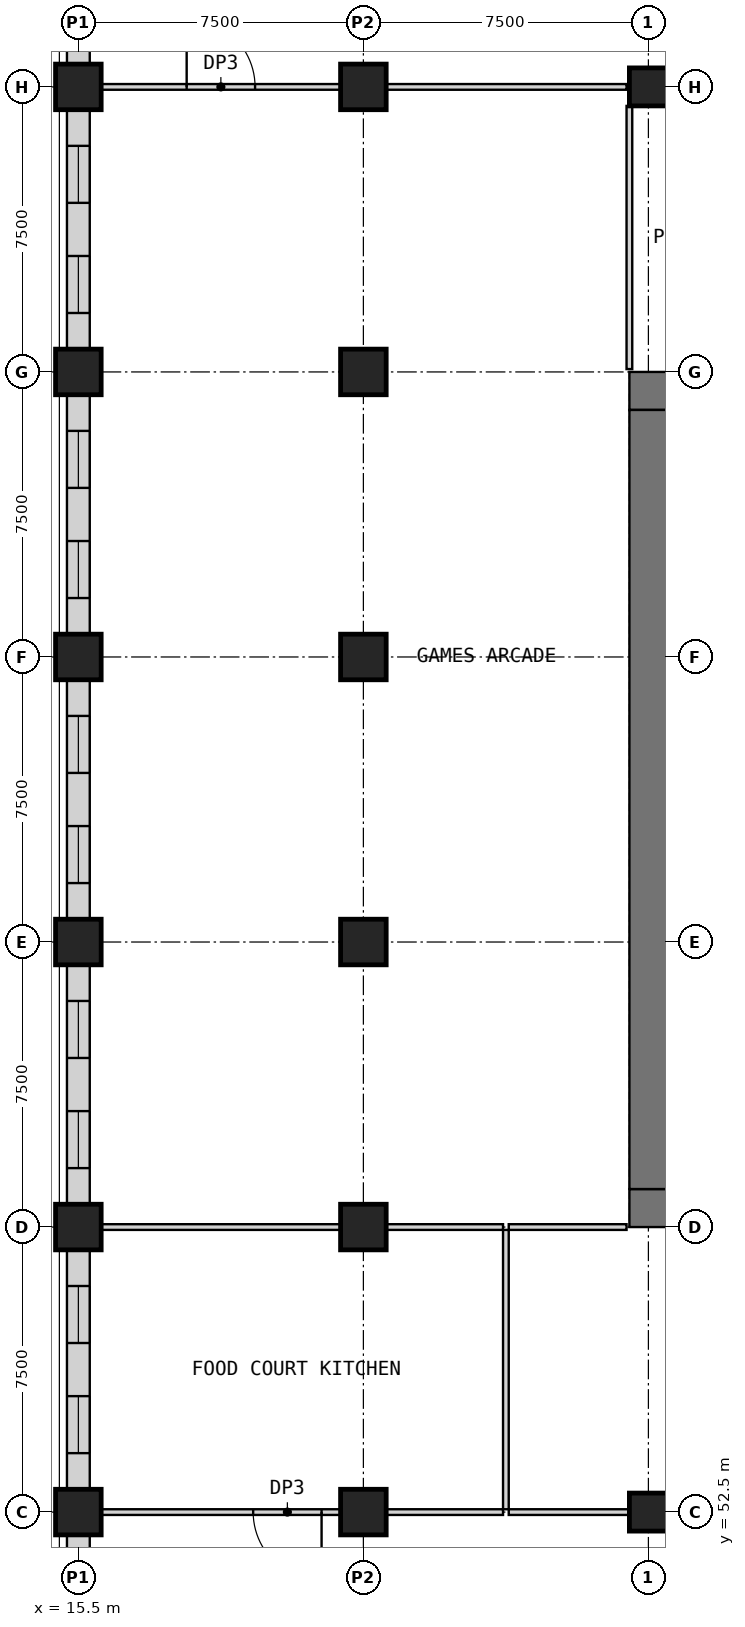
"""IFC4 building model, lengths in metres.
Left out: names, types, materials, properties, quantities, classifications, styles, units other than length and angle.
Written with IfcOpenShell. Run it as: python <this file> out.ifc"""

import sys

from ifc_helpers import new_model, si_unit, direction, frame, frame_2d, origin, origin_2d, place, context, subcontext, project, spatial, rectangle, extrude, element, fill, save


model = new_model("IFC4")
c1 = context("Model", 3, precision=1e-05, world=origin(), true_north=direction((0.0, 1.0)))
c2 = subcontext(c1, "Body", "Model", "MODEL_VIEW")
j1 = project(units=[si_unit("LENGTHUNIT", "METRE"), si_unit("PLANEANGLEUNIT", "RADIAN")], contexts=[c1])
p1 = place(None, origin())
s1 = spatial("IfcSite", under=j1, at=p1, CompositionType="ELEMENT")
p2 = place(p1, origin())
s2 = spatial("IfcBuilding", under=s1, at=p2, CompositionType="ELEMENT")
p3 = place(p2, frame((0.0, 0.0, 18.5)))
s3 = spatial("IfcBuildingStorey", under=s2, at=p3, CompositionType="ELEMENT", Elevation=18.5)
for number, where, z_axis, x_axis in (
    (1, (30.5, 52.5, 0.0), (0.0, 0.0, 1.0), (1.0, 0.0, 0.0)),
    (2, (30.5, 90.0, 0.0), (0.0, 0.0, 1.0), (1.0, 0.0, 0.0)),
):
    element("IfcColumn", number, at=place(p3, frame(where, z_axis=z_axis, x_axis=x_axis)), inside=s3, PredefinedType="COLUMN", context=c2, shape_type="SweptSolid", body=[
        extrude(rectangle(XDim=1.0, YDim=1.0, at=origin_2d()), origin(), (0.0, 0.0, 1.0), 5.0),
    ])
for number, where, z_axis, x_axis in (
    (3, (15.5, 52.5, 0.0), (0.0, 0.0, 1.0), (1.0, 0.0, 0.0)),
    (4, (15.5, 60.0, 0.0), (0.0, 0.0, 1.0), (1.0, 0.0, 0.0)),
    (5, (15.5, 67.5, 0.0), (0.0, 0.0, 1.0), (1.0, 0.0, 0.0)),
    (6, (15.5, 75.0, 0.0), (0.0, 0.0, 1.0), (1.0, 0.0, 0.0)),
    (7, (15.5, 82.5, 0.0), (0.0, 0.0, 1.0), (1.0, 0.0, 0.0)),
    (8, (15.5, 90.0, 0.0), (0.0, 0.0, 1.0), (1.0, 0.0, 0.0)),
    (9, (23.0, 52.5, 0.0), (0.0, 0.0, 1.0), (1.0, 0.0, 0.0)),
    (10, (23.0, 60.0, 0.0), (0.0, 0.0, 1.0), (1.0, 0.0, 0.0)),
    (11, (23.0, 67.5, 0.0), (0.0, 0.0, 1.0), (1.0, 0.0, 0.0)),
    (12, (23.0, 75.0, 0.0), (0.0, 0.0, 1.0), (1.0, 0.0, 0.0)),
    (13, (23.0, 82.5, 0.0), (0.0, 0.0, 1.0), (1.0, 0.0, 0.0)),
    (14, (23.0, 90.0, 0.0), (0.0, 0.0, 1.0), (1.0, 0.0, 0.0)),
):
    element("IfcColumn", number, at=place(p3, frame(where, z_axis=z_axis, x_axis=x_axis)), inside=s3, PredefinedType="COLUMN", context=c2, shape_type="SweptSolid", body=[
        extrude(rectangle(XDim=1.2, YDim=1.2, at=origin_2d()), origin(), (0.0, 0.0, 1.0), 5.0),
    ])
p4 = place(p3, frame((30.0, 60.5, 0.0), z_axis=(0.0, 0.0, 1.0), x_axis=(1.0, 0.0, 0.0)))
e15 = element("IfcWall", 15, at=p4, inside=s3, PredefinedType="SHEAR", context=c2, shape_type="SweptSolid", body=[
    extrude(rectangle(XDim=30.0, YDim=1.0, at=frame_2d((15.0, 0.0))), origin(), (0.0, 0.0, 1.0), 5.0),
])
p5 = place(p4, frame((21.9, 0.0, 0.0)))
e16 = element("IfcOpeningElement", 16, at=p5, cuts=e15, PredefinedType="OPENING", context=c2, shape_type="SweptSolid", body=[
    extrude(rectangle(XDim=1.8, YDim=2.1, at=frame_2d((0.9, 1.05))), frame((0.0, 0.51, 0.0), z_axis=(0.0, -1.0, 0.0), x_axis=(1.0, 0.0, 0.0)), (0.0, 0.0, 1.0), 1.02),
])
p6 = place(p4, frame((26.5, 0.0, 0.0)))
e17 = element("IfcOpeningElement", 17, at=p6, cuts=e15, PredefinedType="OPENING", context=c2, shape_type="SweptSolid", body=[
    extrude(rectangle(XDim=1.2, YDim=2.1, at=frame_2d((0.6, 1.05))), frame((0.0, 0.51, 0.0), z_axis=(0.0, -1.0, 0.0), x_axis=(1.0, 0.0, 0.0)), (0.0, 0.0, 1.0), 1.02),
])
p7 = place(p3, frame((30.0, 82.0, 0.0), z_axis=(0.0, 0.0, 1.0), x_axis=(1.0, 0.0, 0.0)))
e18 = element("IfcWall", 18, at=p7, inside=s3, PredefinedType="SHEAR", context=c2, shape_type="SweptSolid", body=[
    extrude(rectangle(XDim=30.0, YDim=1.0, at=frame_2d((15.0, 0.0))), origin(), (0.0, 0.0, 1.0), 5.0),
])
p8 = place(p3, frame((30.5, 61.0, 0.0), z_axis=(0.0, 0.0, 1.0), x_axis=(0.0, 1.0, 0.0)))
e19 = element("IfcWall", 19, at=p8, inside=s3, PredefinedType="SHEAR", context=c2, shape_type="SweptSolid", body=[
    extrude(rectangle(XDim=20.5, YDim=1.0, at=frame_2d((10.25, 0.0))), origin(), (0.0, 0.0, 1.0), 5.0),
])
p9 = place(p3, frame((22.4, 52.5, 0.0), z_axis=(0.0, 0.0, 1.0), x_axis=(-1.0, 0.0, 0.0)))
e20 = element("IfcWall", 20, at=p9, inside=s3, PredefinedType="PARTITIONING", context=c2, shape_type="SweptSolid", body=[
    extrude(rectangle(XDim=6.3, YDim=0.15, at=frame_2d((3.15, 0.0))), origin(), (0.0, 0.0, 1.0), 4.7),
])
p10 = place(p9, frame((0.5, 0.0, 0.0)))
e21 = element("IfcOpeningElement", 21, at=p10, cuts=e20, PredefinedType="OPENING", context=c2, shape_type="SweptSolid", body=[
    extrude(rectangle(XDim=1.8, YDim=2.4, at=frame_2d((0.9, 1.2))), frame((0.0, 0.085, 0.0), z_axis=(0.0, -1.0, 0.0), x_axis=(1.0, 0.0, 0.0)), (0.0, 0.0, 1.0), 0.17),
])
p11 = place(p3, frame((23.6, 52.5, 0.0), z_axis=(0.0, 0.0, 1.0), x_axis=(1.0, 0.0, 0.0)))
e22 = element("IfcWall", 22, at=p11, inside=s3, PredefinedType="PARTITIONING", context=c2, shape_type="SweptSolid", body=[
    extrude(rectangle(XDim=3.075, YDim=0.15, at=frame_2d((1.538, 0.0))), origin(), (0.0, 0.0, 1.0), 4.7),
])
p12 = place(p3, frame((26.825, 52.5, 0.0), z_axis=(0.0, 0.0, 1.0), x_axis=(1.0, 0.0, 0.0)))
e23 = element("IfcWall", 23, at=p12, inside=s3, PredefinedType="PARTITIONING", context=c2, shape_type="SweptSolid", body=[
    extrude(rectangle(XDim=3.175, YDim=0.15, at=frame_2d((1.587, 0.0))), origin(), (0.0, 0.0, 1.0), 4.7),
])
p13 = place(p3, frame((16.1, 60.0, 0.0), z_axis=(0.0, 0.0, 1.0), x_axis=(1.0, 0.0, 0.0)))
e24 = element("IfcWall", 24, at=p13, inside=s3, PredefinedType="PARTITIONING", context=c2, shape_type="SweptSolid", body=[
    extrude(rectangle(XDim=6.3, YDim=0.15, at=frame_2d((3.15, 0.0))), origin(), (0.0, 0.0, 1.0), 4.7),
])
p14 = place(p3, frame((23.6, 60.0, 0.0), z_axis=(0.0, 0.0, 1.0), x_axis=(1.0, 0.0, 0.0)))
e25 = element("IfcWall", 25, at=p14, inside=s3, PredefinedType="PARTITIONING", context=c2, shape_type="SweptSolid", body=[
    extrude(rectangle(XDim=3.075, YDim=0.15, at=frame_2d((1.538, 0.0))), origin(), (0.0, 0.0, 1.0), 4.7),
])
p15 = place(p3, frame((26.825, 60.0, 0.0), z_axis=(0.0, 0.0, 1.0), x_axis=(1.0, 0.0, 0.0)))
e26 = element("IfcWall", 26, at=p15, inside=s3, PredefinedType="PARTITIONING", context=c2, shape_type="SweptSolid", body=[
    extrude(rectangle(XDim=3.1, YDim=0.15, at=frame_2d((1.55, 0.0))), origin(), (0.0, 0.0, 1.0), 4.7),
])
p16 = place(p3, frame((16.1, 90.0, 0.0), z_axis=(0.0, 0.0, 1.0), x_axis=(1.0, 0.0, 0.0)))
e27 = element("IfcWall", 27, at=p16, inside=s3, PredefinedType="PARTITIONING", context=c2, shape_type="SweptSolid", body=[
    extrude(rectangle(XDim=6.3, YDim=0.15, at=frame_2d((3.15, 0.0))), origin(), (0.0, 0.0, 1.0), 4.7),
])
p17 = place(p16, frame((2.25, 0.0, 0.0)))
e28 = element("IfcOpeningElement", 28, at=p17, cuts=e27, PredefinedType="OPENING", context=c2, shape_type="SweptSolid", body=[
    extrude(rectangle(XDim=1.8, YDim=2.4, at=frame_2d((0.9, 1.2))), frame((0.0, 0.085, 0.0), z_axis=(0.0, -1.0, 0.0), x_axis=(1.0, 0.0, 0.0)), (0.0, 0.0, 1.0), 0.17),
])
p18 = place(p3, frame((23.6, 90.0, 0.0), z_axis=(0.0, 0.0, 1.0), x_axis=(1.0, 0.0, 0.0)))
e29 = element("IfcWall", 29, at=p18, inside=s3, PredefinedType="PARTITIONING", context=c2, shape_type="SweptSolid", body=[
    extrude(rectangle(XDim=6.325, YDim=0.15, at=frame_2d((3.163, 0.0))), origin(), (0.0, 0.0, 1.0), 4.7),
])
p19 = place(p3, frame((15.5, 46.1, 0.0), z_axis=(0.0, 0.0, 1.0), x_axis=(0.0, 1.0, 0.0)))
e30 = element("IfcWall", 30, at=p19, inside=s3, PredefinedType="PARTITIONING", context=c2, shape_type="SweptSolid", body=[
    extrude(rectangle(XDim=5.8, YDim=0.6, at=frame_2d((2.9, 0.0))), origin(), (0.0, 0.0, 1.0), 4.1),
])
p20 = place(p19, frame((0.816, 0.0, 0.9)))
e31 = element("IfcOpeningElement", 31, at=p20, cuts=e30, PredefinedType="OPENING", context=c2, shape_type="SweptSolid", body=[
    extrude(rectangle(XDim=1.5, YDim=2.8, at=frame_2d((0.75, 1.4))), frame((0.0, 0.31, 0.0), z_axis=(0.0, -1.0, 0.0), x_axis=(1.0, 0.0, 0.0)), (0.0, 0.0, 1.0), 0.62),
])
p21 = place(p19, frame((3.484, 0.0, 0.9)))
e32 = element("IfcOpeningElement", 32, at=p21, cuts=e30, PredefinedType="OPENING", context=c2, shape_type="SweptSolid", body=[
    extrude(rectangle(XDim=1.5, YDim=2.8, at=frame_2d((0.75, 1.4))), frame((0.0, 0.31, 0.0), z_axis=(0.0, -1.0, 0.0), x_axis=(1.0, 0.0, 0.0)), (0.0, 0.0, 1.0), 0.62),
])
p22 = place(p3, frame((15.5, 53.1, 0.0), z_axis=(0.0, 0.0, 1.0), x_axis=(0.0, 1.0, 0.0)))
e33 = element("IfcWall", 33, at=p22, inside=s3, PredefinedType="PARTITIONING", context=c2, shape_type="SweptSolid", body=[
    extrude(rectangle(XDim=6.3, YDim=0.6, at=frame_2d((3.15, 0.0))), origin(), (0.0, 0.0, 1.0), 4.1),
])
p23 = place(p22, frame((0.951, 0.0, 0.9)))
e34 = element("IfcOpeningElement", 34, at=p23, cuts=e33, PredefinedType="OPENING", context=c2, shape_type="SweptSolid", body=[
    extrude(rectangle(XDim=1.5, YDim=2.8, at=frame_2d((0.75, 1.4))), frame((0.0, 0.31, 0.0), z_axis=(0.0, -1.0, 0.0), x_axis=(1.0, 0.0, 0.0)), (0.0, 0.0, 1.0), 0.62),
])
p24 = place(p22, frame((3.849, 0.0, 0.9)))
e35 = element("IfcOpeningElement", 35, at=p24, cuts=e33, PredefinedType="OPENING", context=c2, shape_type="SweptSolid", body=[
    extrude(rectangle(XDim=1.5, YDim=2.8, at=frame_2d((0.75, 1.4))), frame((0.0, 0.31, 0.0), z_axis=(0.0, -1.0, 0.0), x_axis=(1.0, 0.0, 0.0)), (0.0, 0.0, 1.0), 0.62),
])
p25 = place(p3, frame((15.5, 60.6, 0.0), z_axis=(0.0, 0.0, 1.0), x_axis=(0.0, 1.0, 0.0)))
e36 = element("IfcWall", 36, at=p25, inside=s3, PredefinedType="PARTITIONING", context=c2, shape_type="SweptSolid", body=[
    extrude(rectangle(XDim=6.3, YDim=0.6, at=frame_2d((3.15, 0.0))), origin(), (0.0, 0.0, 1.0), 4.1),
])
p26 = place(p25, frame((0.951, 0.0, 0.9)))
e37 = element("IfcOpeningElement", 37, at=p26, cuts=e36, PredefinedType="OPENING", context=c2, shape_type="SweptSolid", body=[
    extrude(rectangle(XDim=1.5, YDim=2.8, at=frame_2d((0.75, 1.4))), frame((0.0, 0.31, 0.0), z_axis=(0.0, -1.0, 0.0), x_axis=(1.0, 0.0, 0.0)), (0.0, 0.0, 1.0), 0.62),
])
p27 = place(p25, frame((3.849, 0.0, 0.9)))
e38 = element("IfcOpeningElement", 38, at=p27, cuts=e36, PredefinedType="OPENING", context=c2, shape_type="SweptSolid", body=[
    extrude(rectangle(XDim=1.5, YDim=2.8, at=frame_2d((0.75, 1.4))), frame((0.0, 0.31, 0.0), z_axis=(0.0, -1.0, 0.0), x_axis=(1.0, 0.0, 0.0)), (0.0, 0.0, 1.0), 0.62),
])
p28 = place(p3, frame((15.5, 68.1, 0.0), z_axis=(0.0, 0.0, 1.0), x_axis=(0.0, 1.0, 0.0)))
e39 = element("IfcWall", 39, at=p28, inside=s3, PredefinedType="PARTITIONING", context=c2, shape_type="SweptSolid", body=[
    extrude(rectangle(XDim=6.3, YDim=0.6, at=frame_2d((3.15, 0.0))), origin(), (0.0, 0.0, 1.0), 4.1),
])
p29 = place(p28, frame((0.951, 0.0, 0.9)))
e40 = element("IfcOpeningElement", 40, at=p29, cuts=e39, PredefinedType="OPENING", context=c2, shape_type="SweptSolid", body=[
    extrude(rectangle(XDim=1.5, YDim=2.8, at=frame_2d((0.75, 1.4))), frame((0.0, 0.31, 0.0), z_axis=(0.0, -1.0, 0.0), x_axis=(1.0, 0.0, 0.0)), (0.0, 0.0, 1.0), 0.62),
])
p30 = place(p28, frame((3.849, 0.0, 0.9)))
e41 = element("IfcOpeningElement", 41, at=p30, cuts=e39, PredefinedType="OPENING", context=c2, shape_type="SweptSolid", body=[
    extrude(rectangle(XDim=1.5, YDim=2.8, at=frame_2d((0.75, 1.4))), frame((0.0, 0.31, 0.0), z_axis=(0.0, -1.0, 0.0), x_axis=(1.0, 0.0, 0.0)), (0.0, 0.0, 1.0), 0.62),
])
p31 = place(p3, frame((15.5, 75.6, 0.0), z_axis=(0.0, 0.0, 1.0), x_axis=(0.0, 1.0, 0.0)))
e42 = element("IfcWall", 42, at=p31, inside=s3, PredefinedType="PARTITIONING", context=c2, shape_type="SweptSolid", body=[
    extrude(rectangle(XDim=6.3, YDim=0.6, at=frame_2d((3.15, 0.0))), origin(), (0.0, 0.0, 1.0), 4.1),
])
p32 = place(p31, frame((0.951, 0.0, 0.9)))
e43 = element("IfcOpeningElement", 43, at=p32, cuts=e42, PredefinedType="OPENING", context=c2, shape_type="SweptSolid", body=[
    extrude(rectangle(XDim=1.5, YDim=2.8, at=frame_2d((0.75, 1.4))), frame((0.0, 0.31, 0.0), z_axis=(0.0, -1.0, 0.0), x_axis=(1.0, 0.0, 0.0)), (0.0, 0.0, 1.0), 0.62),
])
p33 = place(p31, frame((3.849, 0.0, 0.9)))
e44 = element("IfcOpeningElement", 44, at=p33, cuts=e42, PredefinedType="OPENING", context=c2, shape_type="SweptSolid", body=[
    extrude(rectangle(XDim=1.5, YDim=2.8, at=frame_2d((0.75, 1.4))), frame((0.0, 0.31, 0.0), z_axis=(0.0, -1.0, 0.0), x_axis=(1.0, 0.0, 0.0)), (0.0, 0.0, 1.0), 0.62),
])
p34 = place(p3, frame((15.5, 83.1, 0.0), z_axis=(0.0, 0.0, 1.0), x_axis=(0.0, 1.0, 0.0)))
e45 = element("IfcWall", 45, at=p34, inside=s3, PredefinedType="PARTITIONING", context=c2, shape_type="SweptSolid", body=[
    extrude(rectangle(XDim=6.3, YDim=0.6, at=frame_2d((3.15, 0.0))), origin(), (0.0, 0.0, 1.0), 4.1),
])
p35 = place(p34, frame((0.951, 0.0, 0.9)))
e46 = element("IfcOpeningElement", 46, at=p35, cuts=e45, PredefinedType="OPENING", context=c2, shape_type="SweptSolid", body=[
    extrude(rectangle(XDim=1.5, YDim=2.8, at=frame_2d((0.75, 1.4))), frame((0.0, 0.31, 0.0), z_axis=(0.0, -1.0, 0.0), x_axis=(1.0, 0.0, 0.0)), (0.0, 0.0, 1.0), 0.62),
])
p36 = place(p34, frame((3.849, 0.0, 0.9)))
e47 = element("IfcOpeningElement", 47, at=p36, cuts=e45, PredefinedType="OPENING", context=c2, shape_type="SweptSolid", body=[
    extrude(rectangle(XDim=1.5, YDim=2.8, at=frame_2d((0.75, 1.4))), frame((0.0, 0.31, 0.0), z_axis=(0.0, -1.0, 0.0), x_axis=(1.0, 0.0, 0.0)), (0.0, 0.0, 1.0), 0.62),
])
p37 = place(p3, frame((15.5, 90.6, 0.0), z_axis=(0.0, 0.0, 1.0), x_axis=(0.0, 1.0, 0.0)))
e48 = element("IfcWall", 48, at=p37, inside=s3, PredefinedType="PARTITIONING", context=c2, shape_type="SweptSolid", body=[
    extrude(rectangle(XDim=5.8, YDim=0.6, at=frame_2d((2.9, 0.0))), origin(), (0.0, 0.0, 1.0), 4.1),
])
p38 = place(p37, frame((0.816, 0.0, 0.9)))
e49 = element("IfcOpeningElement", 49, at=p38, cuts=e48, PredefinedType="OPENING", context=c2, shape_type="SweptSolid", body=[
    extrude(rectangle(XDim=1.5, YDim=2.8, at=frame_2d((0.75, 1.4))), frame((0.0, 0.31, 0.0), z_axis=(0.0, -1.0, 0.0), x_axis=(1.0, 0.0, 0.0)), (0.0, 0.0, 1.0), 0.62),
])
p39 = place(p37, frame((3.484, 0.0, 0.9)))
e50 = element("IfcOpeningElement", 50, at=p39, cuts=e48, PredefinedType="OPENING", context=c2, shape_type="SweptSolid", body=[
    extrude(rectangle(XDim=1.5, YDim=2.8, at=frame_2d((0.75, 1.4))), frame((0.0, 0.31, 0.0), z_axis=(0.0, -1.0, 0.0), x_axis=(1.0, 0.0, 0.0)), (0.0, 0.0, 1.0), 0.62),
])
p40 = place(p3, frame((26.75, 52.575, 0.0), z_axis=(0.0, 0.0, 1.0), x_axis=(0.0, 1.0, 0.0)))
e51 = element("IfcWall", 51, at=p40, inside=s3, PredefinedType="PARTITIONING", context=c2, shape_type="SweptSolid", body=[
    extrude(rectangle(XDim=7.35, YDim=0.15, at=frame_2d((3.675, 0.0))), origin(), (0.0, 0.0, 1.0), 4.7),
])
p41 = place(p3, frame((30.0, 82.575, 0.0), z_axis=(0.0, 0.0, 1.0), x_axis=(0.0, 1.0, 0.0)))
e52 = element("IfcWall", 52, at=p41, inside=s3, PredefinedType="PARTITIONING", context=c2, shape_type="SweptSolid", body=[
    extrude(rectangle(XDim=6.925, YDim=0.15, at=frame_2d((3.462, 0.0))), origin(), (0.0, 0.0, 1.0), 4.7),
])
p42 = place(p10, origin())
e53 = element("IfcDoor", 53, at=p42, inside=s3, OperationType="SINGLE_SWING_LEFT", PredefinedType="DOOR", context=c2, shape_type="SweptSolid", body=[
    extrude(rectangle(XDim=1.8, YDim=2.4, at=frame_2d((0.9, 1.2))), frame((0.0, 0.025, 0.0), z_axis=(0.0, -1.0, 0.0), x_axis=(1.0, 0.0, 0.0)), (0.0, 0.0, 1.0), 0.05),
])
fill(e21, e53)
p43 = place(p17, origin())
e54 = element("IfcDoor", 54, at=p43, inside=s3, OperationType="SINGLE_SWING_LEFT", PredefinedType="DOOR", context=c2, shape_type="SweptSolid", body=[
    extrude(rectangle(XDim=1.8, YDim=2.4, at=frame_2d((0.9, 1.2))), frame((0.0, 0.025, 0.0), z_axis=(0.0, -1.0, 0.0), x_axis=(1.0, 0.0, 0.0)), (0.0, 0.0, 1.0), 0.05),
])
fill(e28, e54)
p44 = place(p23, origin())
e55 = element("IfcWindow", 55, at=p44, inside=s3, PartitioningType="SINGLE_PANEL", PredefinedType="WINDOW", context=c2, shape_type="SweptSolid", body=[
    extrude(rectangle(XDim=1.5, YDim=2.8, at=frame_2d((0.75, 1.4))), frame((0.0, 0.03, 0.0), z_axis=(0.0, -1.0, 0.0), x_axis=(1.0, 0.0, 0.0)), (0.0, 0.0, 1.0), 0.06),
])
fill(e34, e55)
p45 = place(p24, origin())
e56 = element("IfcWindow", 56, at=p45, inside=s3, PartitioningType="SINGLE_PANEL", PredefinedType="WINDOW", context=c2, shape_type="SweptSolid", body=[
    extrude(rectangle(XDim=1.5, YDim=2.8, at=frame_2d((0.75, 1.4))), frame((0.0, 0.03, 0.0), z_axis=(0.0, -1.0, 0.0), x_axis=(1.0, 0.0, 0.0)), (0.0, 0.0, 1.0), 0.06),
])
fill(e35, e56)
p46 = place(p26, origin())
e57 = element("IfcWindow", 57, at=p46, inside=s3, PartitioningType="SINGLE_PANEL", PredefinedType="WINDOW", context=c2, shape_type="SweptSolid", body=[
    extrude(rectangle(XDim=1.5, YDim=2.8, at=frame_2d((0.75, 1.4))), frame((0.0, 0.03, 0.0), z_axis=(0.0, -1.0, 0.0), x_axis=(1.0, 0.0, 0.0)), (0.0, 0.0, 1.0), 0.06),
])
fill(e37, e57)
p47 = place(p27, origin())
e58 = element("IfcWindow", 58, at=p47, inside=s3, PartitioningType="SINGLE_PANEL", PredefinedType="WINDOW", context=c2, shape_type="SweptSolid", body=[
    extrude(rectangle(XDim=1.5, YDim=2.8, at=frame_2d((0.75, 1.4))), frame((0.0, 0.03, 0.0), z_axis=(0.0, -1.0, 0.0), x_axis=(1.0, 0.0, 0.0)), (0.0, 0.0, 1.0), 0.06),
])
fill(e38, e58)
p48 = place(p29, origin())
e59 = element("IfcWindow", 59, at=p48, inside=s3, PartitioningType="SINGLE_PANEL", PredefinedType="WINDOW", context=c2, shape_type="SweptSolid", body=[
    extrude(rectangle(XDim=1.5, YDim=2.8, at=frame_2d((0.75, 1.4))), frame((0.0, 0.03, 0.0), z_axis=(0.0, -1.0, 0.0), x_axis=(1.0, 0.0, 0.0)), (0.0, 0.0, 1.0), 0.06),
])
fill(e40, e59)
p49 = place(p30, origin())
e60 = element("IfcWindow", 60, at=p49, inside=s3, PartitioningType="SINGLE_PANEL", PredefinedType="WINDOW", context=c2, shape_type="SweptSolid", body=[
    extrude(rectangle(XDim=1.5, YDim=2.8, at=frame_2d((0.75, 1.4))), frame((0.0, 0.03, 0.0), z_axis=(0.0, -1.0, 0.0), x_axis=(1.0, 0.0, 0.0)), (0.0, 0.0, 1.0), 0.06),
])
fill(e41, e60)
p50 = place(p32, origin())
e61 = element("IfcWindow", 61, at=p50, inside=s3, PartitioningType="SINGLE_PANEL", PredefinedType="WINDOW", context=c2, shape_type="SweptSolid", body=[
    extrude(rectangle(XDim=1.5, YDim=2.8, at=frame_2d((0.75, 1.4))), frame((0.0, 0.03, 0.0), z_axis=(0.0, -1.0, 0.0), x_axis=(1.0, 0.0, 0.0)), (0.0, 0.0, 1.0), 0.06),
])
fill(e43, e61)
p51 = place(p33, origin())
e62 = element("IfcWindow", 62, at=p51, inside=s3, PartitioningType="SINGLE_PANEL", PredefinedType="WINDOW", context=c2, shape_type="SweptSolid", body=[
    extrude(rectangle(XDim=1.5, YDim=2.8, at=frame_2d((0.75, 1.4))), frame((0.0, 0.03, 0.0), z_axis=(0.0, -1.0, 0.0), x_axis=(1.0, 0.0, 0.0)), (0.0, 0.0, 1.0), 0.06),
])
fill(e44, e62)
p52 = place(p35, origin())
e63 = element("IfcWindow", 63, at=p52, inside=s3, PartitioningType="SINGLE_PANEL", PredefinedType="WINDOW", context=c2, shape_type="SweptSolid", body=[
    extrude(rectangle(XDim=1.5, YDim=2.8, at=frame_2d((0.75, 1.4))), frame((0.0, 0.03, 0.0), z_axis=(0.0, -1.0, 0.0), x_axis=(1.0, 0.0, 0.0)), (0.0, 0.0, 1.0), 0.06),
])
fill(e46, e63)
p53 = place(p36, origin())
e64 = element("IfcWindow", 64, at=p53, inside=s3, PartitioningType="SINGLE_PANEL", PredefinedType="WINDOW", context=c2, shape_type="SweptSolid", body=[
    extrude(rectangle(XDim=1.5, YDim=2.8, at=frame_2d((0.75, 1.4))), frame((0.0, 0.03, 0.0), z_axis=(0.0, -1.0, 0.0), x_axis=(1.0, 0.0, 0.0)), (0.0, 0.0, 1.0), 0.06),
])
fill(e47, e64)
save(model, sys.argv[1])
